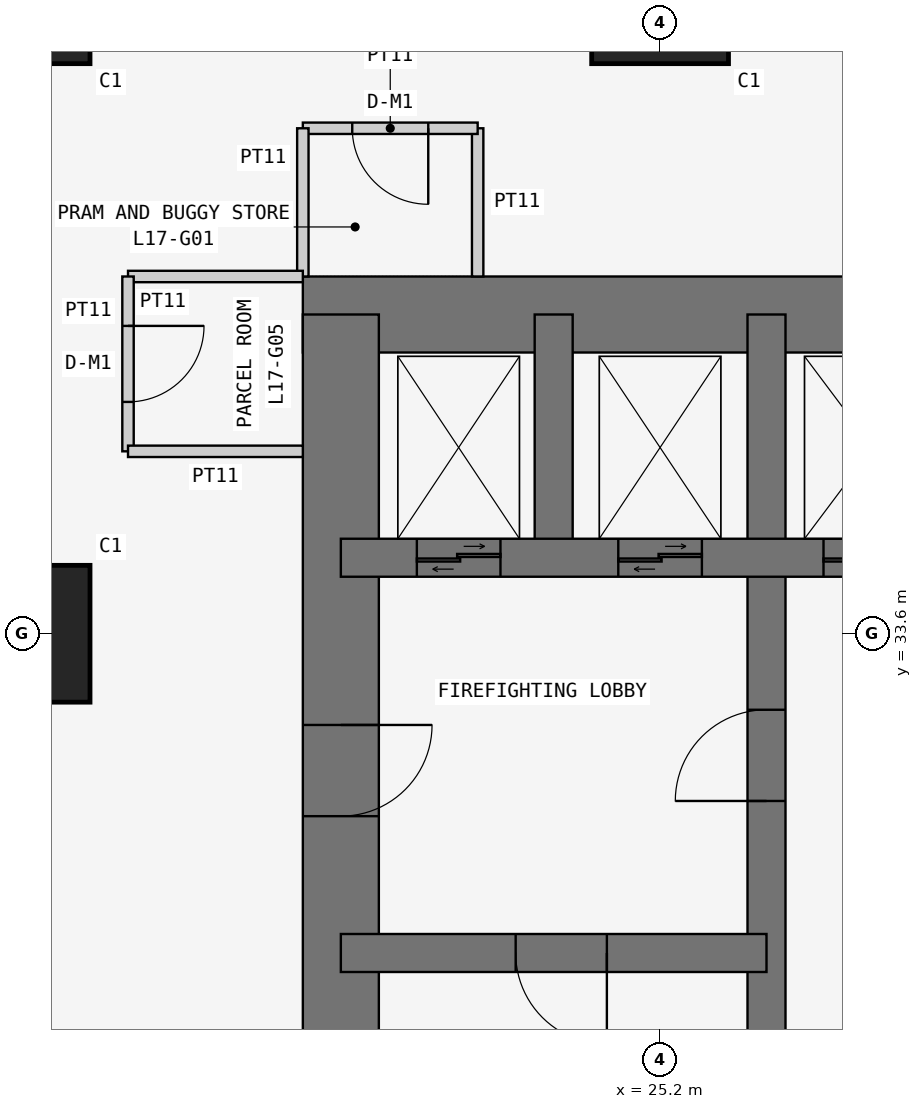
"""IFC4 building model, lengths in metres.
Left out: names, types, materials, properties, quantities, classifications, styles, units other than length and angle.
Written with IfcOpenShell. Run it as: python <this file> out.ifc"""

import sys

from ifc_helpers import new_model, si_unit, direction, frame, frame_2d, origin, origin_2d, place, context, subcontext, project, spatial, rectangle, extrude, element, fill, save


model = new_model("IFC4")
c1 = context("Model", 3, precision=1e-05, world=origin(), true_north=direction((0.0, 1.0)))
c2 = subcontext(c1, "Body", "Model", "MODEL_VIEW")
j1 = project(units=[si_unit("LENGTHUNIT", "METRE"), si_unit("PLANEANGLEUNIT", "RADIAN")], contexts=[c1])
p1 = place(None, origin())
s1 = spatial("IfcSite", under=j1, at=p1, CompositionType="ELEMENT")
p2 = place(p1, origin())
s2 = spatial("IfcBuilding", under=s1, at=p2, CompositionType="ELEMENT")
p3 = place(p2, frame((0.0, 0.0, 70.5)))
s3 = spatial("IfcBuildingStorey", under=s2, at=p3, CompositionType="ELEMENT", Elevation=70.5)
for number, where, z_axis, x_axis in (
    (1, (16.8, 33.6, 0.0), (0.0, 0.0, 1.0), (1.0, 0.0, 0.0)),
    (2, (16.8, 42.0, 0.0), (0.0, 0.0, 1.0), (1.0, 0.0, 0.0)),
    (3, (25.2, 42.0, 0.0), (0.0, 0.0, 1.0), (1.0, 0.0, 0.0)),
):
    element("IfcColumn", number, at=place(p3, frame(where, z_axis=z_axis, x_axis=x_axis)), inside=s3, PredefinedType="COLUMN", context=c2, shape_type="SweptSolid", body=[
        extrude(rectangle(XDim=1.8, YDim=1.8, at=origin_2d()), origin(), (0.0, 0.0, 1.0), 3.6),
    ])
p4 = place(p3, frame((37.8, 37.8, 0.0), z_axis=(0.0, 0.0, 1.0), x_axis=(-1.0, 0.0, 0.0)))
e4 = element("IfcWall", 4, at=p4, inside=s3, PredefinedType="SHEAR", context=c2, shape_type="SweptSolid", body=[
    extrude(rectangle(XDim=17.3, YDim=1.0, at=frame_2d((8.65, 0.0))), origin(), (0.0, 0.0, 1.0), 3.6),
])
p5 = place(p3, frame((21.0, 37.8, 0.0), z_axis=(0.0, 0.0, 1.0), x_axis=(0.0, -1.0, 0.0)))
e5 = element("IfcWall", 5, at=p5, inside=s3, PredefinedType="SHEAR", context=c2, shape_type="SweptSolid", body=[
    extrude(rectangle(XDim=17.3, YDim=1.0, at=frame_2d((8.65, 0.0))), origin(), (0.0, 0.0, 1.0), 3.6),
])
p6 = place(p5, frame((5.4, 0.0, 0.0)))
e6 = element("IfcOpeningElement", 6, at=p6, cuts=e5, PredefinedType="OPENING", context=c2, shape_type="SweptSolid", body=[
    extrude(rectangle(XDim=1.2, YDim=2.1, at=frame_2d((0.6, 1.05))), frame((0.0, 0.51, 0.0), z_axis=(0.0, -1.0, 0.0), x_axis=(1.0, 0.0, 0.0)), (0.0, 0.0, 1.0), 1.02),
])
p7 = place(p3, frame((26.6, 21.0, 0.0), z_axis=(0.0, 0.0, 1.0), x_axis=(0.0, 1.0, 0.0)))
e7 = element("IfcWall", 7, at=p7, inside=s3, PredefinedType="SHEAR", context=c2, shape_type="SweptSolid", body=[
    extrude(rectangle(XDim=16.8, YDim=0.5, at=frame_2d((8.4, 0.0))), origin(), (0.0, 0.0, 1.0), 3.6),
])
p8 = place(p7, frame((10.4, 0.0, 0.0)))
e8 = element("IfcOpeningElement", 8, at=p8, cuts=e7, PredefinedType="OPENING", context=c2, shape_type="SweptSolid", body=[
    extrude(rectangle(XDim=1.2, YDim=2.1, at=frame_2d((0.6, 1.05))), frame((0.0, 0.26, 0.0), z_axis=(0.0, -1.0, 0.0), x_axis=(1.0, 0.0, 0.0)), (0.0, 0.0, 1.0), 0.52),
])
p9 = place(p3, frame((21.0, 29.4, 0.0), z_axis=(0.0, 0.0, 1.0), x_axis=(1.0, 0.0, 0.0)))
e9 = element("IfcWall", 9, at=p9, inside=s3, PredefinedType="SHEAR", context=c2, shape_type="SweptSolid", body=[
    extrude(rectangle(XDim=5.6, YDim=0.5, at=frame_2d((2.8, 0.0))), origin(), (0.0, 0.0, 1.0), 3.6),
])
p10 = place(p9, frame((2.3, 0.0, 0.0)))
e10 = element("IfcOpeningElement", 10, at=p10, cuts=e9, PredefinedType="OPENING", context=c2, shape_type="SweptSolid", body=[
    extrude(rectangle(XDim=1.2, YDim=2.1, at=frame_2d((0.6, 1.05))), frame((0.0, 0.26, 0.0), z_axis=(0.0, -1.0, 0.0), x_axis=(1.0, 0.0, 0.0)), (0.0, 0.0, 1.0), 0.52),
])
p11 = place(p3, frame((21.0, 34.6, 0.0), z_axis=(0.0, 0.0, 1.0), x_axis=(1.0, 0.0, 0.0)))
e11 = element("IfcWall", 11, at=p11, inside=s3, PredefinedType="SHEAR", context=c2, shape_type="SweptSolid", body=[
    extrude(rectangle(XDim=11.2, YDim=0.5, at=frame_2d((5.6, 0.0))), origin(), (0.0, 0.0, 1.0), 3.6),
])
p12 = place(p11, frame((9.35, 0.0, 0.0)))
e12 = element("IfcOpeningElement", 12, at=p12, cuts=e11, PredefinedType="OPENING", context=c2, shape_type="SweptSolid", body=[
    extrude(rectangle(XDim=0.9, YDim=2.1, at=frame_2d((0.45, 1.05))), frame((0.0, 0.26, 0.0), z_axis=(0.0, -1.0, 0.0), x_axis=(1.0, 0.0, 0.0)), (0.0, 0.0, 1.0), 0.52),
])
p13 = place(p11, frame((1.0, 0.0, 0.0)))
e13 = element("IfcOpeningElement", 13, at=p13, cuts=e11, PredefinedType="OPENING", context=c2, shape_type="SweptSolid", body=[
    extrude(rectangle(XDim=1.1, YDim=2.1, at=frame_2d((0.55, 1.05))), frame((0.0, 0.26, 0.0), z_axis=(0.0, -1.0, 0.0), x_axis=(1.0, 0.0, 0.0)), (0.0, 0.0, 1.0), 0.52),
])
p14 = place(p11, frame((3.65, 0.0, 0.0)))
e14 = element("IfcOpeningElement", 14, at=p14, cuts=e11, PredefinedType="OPENING", context=c2, shape_type="SweptSolid", body=[
    extrude(rectangle(XDim=1.1, YDim=2.1, at=frame_2d((0.55, 1.05))), frame((0.0, 0.26, 0.0), z_axis=(0.0, -1.0, 0.0), x_axis=(1.0, 0.0, 0.0)), (0.0, 0.0, 1.0), 0.52),
])
p15 = place(p11, frame((6.35, 0.0, 0.0)))
e15 = element("IfcOpeningElement", 15, at=p15, cuts=e11, PredefinedType="OPENING", context=c2, shape_type="SweptSolid", body=[
    extrude(rectangle(XDim=1.3, YDim=2.1, at=frame_2d((0.65, 1.05))), frame((0.0, 0.26, 0.0), z_axis=(0.0, -1.0, 0.0), x_axis=(1.0, 0.0, 0.0)), (0.0, 0.0, 1.0), 0.52),
])
p16 = place(p3, frame((23.8, 34.6, 0.0), z_axis=(0.0, 0.0, 1.0), x_axis=(0.0, 1.0, 0.0)))
e16 = element("IfcWall", 16, at=p16, inside=s3, PredefinedType="SHEAR", context=c2, shape_type="SweptSolid", body=[
    extrude(rectangle(XDim=3.2, YDim=0.5, at=frame_2d((1.6, 0.0))), origin(), (0.0, 0.0, 1.0), 3.6),
])
p17 = place(p3, frame((22.8, 38.3, 0.0), z_axis=(0.0, 0.0, 1.0), x_axis=(0.0, 1.0, 0.0)))
e17 = element("IfcWall", 17, at=p17, inside=s3, PredefinedType="PARTITIONING", context=c2, shape_type="SweptSolid", body=[
    extrude(rectangle(XDim=1.95, YDim=0.15, at=frame_2d((0.975, 0.0))), origin(), (0.0, 0.0, 1.0), 3.45),
])
p18 = place(p3, frame((22.8, 40.25, 0.0), z_axis=(0.0, 0.0, 1.0), x_axis=(-1.0, 0.0, 0.0)))
e18 = element("IfcWall", 18, at=p18, inside=s3, PredefinedType="PARTITIONING", context=c2, shape_type="SweptSolid", body=[
    extrude(rectangle(XDim=2.3, YDim=0.15, at=frame_2d((1.15, 0.0))), origin(), (0.0, 0.0, 1.0), 3.45),
])
p19 = place(p18, frame((0.65, 0.0, 0.0)))
e19 = element("IfcOpeningElement", 19, at=p19, cuts=e18, PredefinedType="OPENING", context=c2, shape_type="SweptSolid", body=[
    extrude(rectangle(XDim=1.0, YDim=2.1, at=frame_2d((0.5, 1.05))), frame((0.0, 0.085, 0.0), z_axis=(0.0, -1.0, 0.0), x_axis=(1.0, 0.0, 0.0)), (0.0, 0.0, 1.0), 0.17),
])
p20 = place(p3, frame((20.5, 40.25, 0.0), z_axis=(0.0, 0.0, 1.0), x_axis=(0.0, -1.0, 0.0)))
e20 = element("IfcWall", 20, at=p20, inside=s3, PredefinedType="PARTITIONING", context=c2, shape_type="SweptSolid", body=[
    extrude(rectangle(XDim=1.95, YDim=0.15, at=frame_2d((0.975, 0.0))), origin(), (0.0, 0.0, 1.0), 3.45),
])
p21 = place(p3, frame((20.5, 38.3, 0.0), z_axis=(0.0, 0.0, 1.0), x_axis=(-1.0, 0.0, 0.0)))
e21 = element("IfcWall", 21, at=p21, inside=s3, PredefinedType="PARTITIONING", context=c2, shape_type="SweptSolid", body=[
    extrude(rectangle(XDim=2.3, YDim=0.15, at=frame_2d((1.15, 0.0))), origin(), (0.0, 0.0, 1.0), 3.45),
])
p22 = place(p3, frame((18.2, 38.3, 0.0), z_axis=(0.0, 0.0, 1.0), x_axis=(0.0, -1.0, 0.0)))
e22 = element("IfcWall", 22, at=p22, inside=s3, PredefinedType="PARTITIONING", context=c2, shape_type="SweptSolid", body=[
    extrude(rectangle(XDim=2.3, YDim=0.15, at=frame_2d((1.15, 0.0))), origin(), (0.0, 0.0, 1.0), 3.45),
])
p23 = place(p22, frame((0.65, 0.0, 0.0)))
e23 = element("IfcOpeningElement", 23, at=p23, cuts=e22, PredefinedType="OPENING", context=c2, shape_type="SweptSolid", body=[
    extrude(rectangle(XDim=1.0, YDim=2.1, at=frame_2d((0.5, 1.05))), frame((0.0, 0.085, 0.0), z_axis=(0.0, -1.0, 0.0), x_axis=(1.0, 0.0, 0.0)), (0.0, 0.0, 1.0), 0.17),
])
p24 = place(p3, frame((18.2, 36.0, 0.0), z_axis=(0.0, 0.0, 1.0), x_axis=(1.0, 0.0, 0.0)))
e24 = element("IfcWall", 24, at=p24, inside=s3, PredefinedType="PARTITIONING", context=c2, shape_type="SweptSolid", body=[
    extrude(rectangle(XDim=2.3, YDim=0.15, at=frame_2d((1.15, 0.0))), origin(), (0.0, 0.0, 1.0), 3.45),
])
p25 = place(p19, origin())
e25 = element("IfcDoor", 25, at=p25, inside=s3, OperationType="SINGLE_SWING_LEFT", PredefinedType="DOOR", context=c2, shape_type="SweptSolid", body=[
    extrude(rectangle(XDim=1.0, YDim=2.1, at=frame_2d((0.5, 1.05))), frame((0.0, 0.025, 0.0), z_axis=(0.0, -1.0, 0.0), x_axis=(1.0, 0.0, 0.0)), (0.0, 0.0, 1.0), 0.05),
])
fill(e19, e25)
p26 = place(p23, origin())
e26 = element("IfcDoor", 26, at=p26, inside=s3, OperationType="SINGLE_SWING_LEFT", PredefinedType="DOOR", context=c2, shape_type="SweptSolid", body=[
    extrude(rectangle(XDim=1.0, YDim=2.1, at=frame_2d((0.5, 1.05))), frame((0.0, 0.025, 0.0), z_axis=(0.0, -1.0, 0.0), x_axis=(1.0, 0.0, 0.0)), (0.0, 0.0, 1.0), 0.05),
])
fill(e23, e26)
p27 = place(p6, origin())
e27 = element("IfcDoor", 27, at=p27, inside=s3, OperationType="SINGLE_SWING_LEFT", PredefinedType="DOOR", context=c2, shape_type="SweptSolid", body=[
    extrude(rectangle(XDim=1.2, YDim=2.1, at=frame_2d((0.6, 1.05))), frame((0.0, 0.025, 0.0), z_axis=(0.0, -1.0, 0.0), x_axis=(1.0, 0.0, 0.0)), (0.0, 0.0, 1.0), 0.05),
])
fill(e6, e27)
p28 = place(p10, frame((1.2, 0.0, 0.0), z_axis=(0.0, 0.0, 1.0), x_axis=(-1.0, 0.0, 0.0)))
e28 = element("IfcDoor", 28, at=p28, inside=s3, OperationType="SINGLE_SWING_LEFT", PredefinedType="DOOR", context=c2, shape_type="SweptSolid", body=[
    extrude(rectangle(XDim=1.2, YDim=2.1, at=frame_2d((0.6, 1.05))), frame((0.0, 0.025, 0.0), z_axis=(0.0, -1.0, 0.0), x_axis=(1.0, 0.0, 0.0)), (0.0, 0.0, 1.0), 0.05),
])
fill(e10, e28)
p29 = place(p8, origin())
e29 = element("IfcDoor", 29, at=p29, inside=s3, OperationType="SINGLE_SWING_LEFT", PredefinedType="DOOR", context=c2, shape_type="SweptSolid", body=[
    extrude(rectangle(XDim=1.2, YDim=2.1, at=frame_2d((0.6, 1.05))), frame((0.0, 0.025, 0.0), z_axis=(0.0, -1.0, 0.0), x_axis=(1.0, 0.0, 0.0)), (0.0, 0.0, 1.0), 0.05),
])
fill(e8, e29)
p30 = place(p13, origin())
e30 = element("IfcDoor", 30, at=p30, inside=s3, OperationType="DOUBLE_DOOR_SLIDING", PredefinedType="DOOR", context=c2, shape_type="SweptSolid", body=[
    extrude(rectangle(XDim=1.1, YDim=2.1, at=frame_2d((0.55, 1.05))), frame((0.0, 0.025, 0.0), z_axis=(0.0, -1.0, 0.0), x_axis=(1.0, 0.0, 0.0)), (0.0, 0.0, 1.0), 0.05),
])
fill(e13, e30)
p31 = place(p14, origin())
e31 = element("IfcDoor", 31, at=p31, inside=s3, OperationType="DOUBLE_DOOR_SLIDING", PredefinedType="DOOR", context=c2, shape_type="SweptSolid", body=[
    extrude(rectangle(XDim=1.1, YDim=2.1, at=frame_2d((0.55, 1.05))), frame((0.0, 0.025, 0.0), z_axis=(0.0, -1.0, 0.0), x_axis=(1.0, 0.0, 0.0)), (0.0, 0.0, 1.0), 0.05),
])
fill(e14, e31)
p32 = place(p15, origin())
e32 = element("IfcDoor", 32, at=p32, inside=s3, OperationType="DOUBLE_DOOR_SLIDING", PredefinedType="DOOR", context=c2, shape_type="SweptSolid", body=[
    extrude(rectangle(XDim=1.3, YDim=2.1, at=frame_2d((0.65, 1.05))), frame((0.0, 0.025, 0.0), z_axis=(0.0, -1.0, 0.0), x_axis=(1.0, 0.0, 0.0)), (0.0, 0.0, 1.0), 0.05),
])
fill(e15, e32)
save(model, sys.argv[1])
